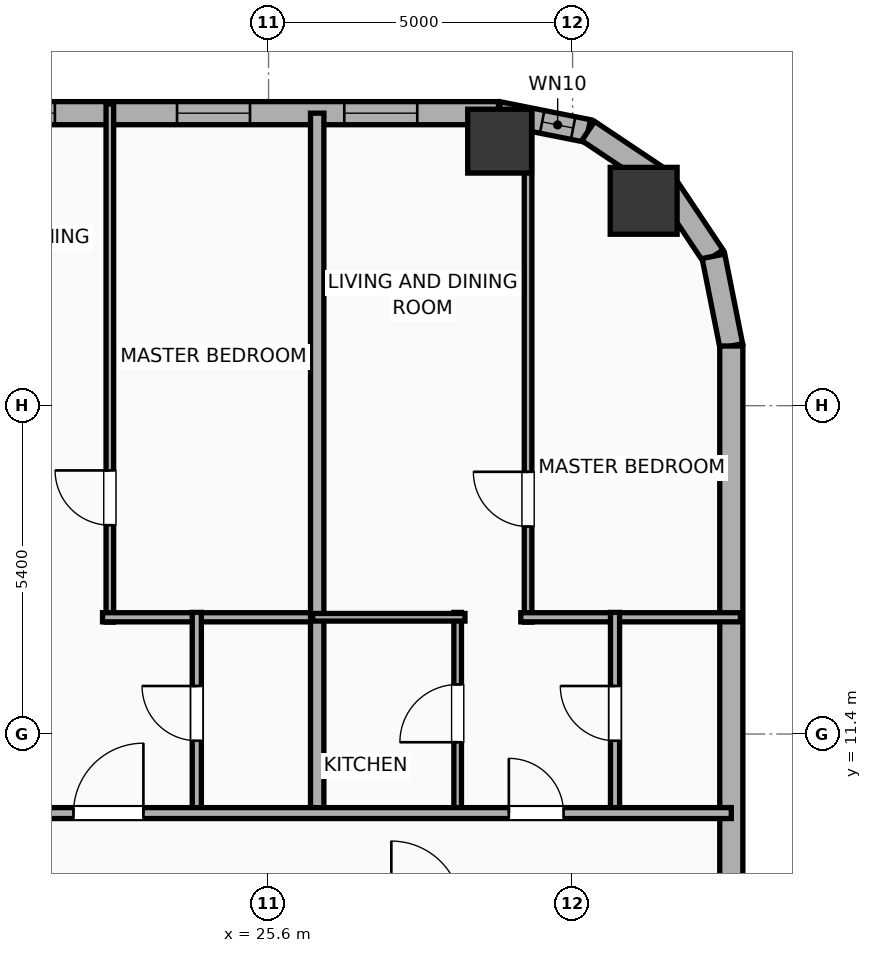
"""IFC4 building model, lengths in metres.
Left out: names, types, materials, properties, quantities, classifications, styles, units other than length and angle.
Written with IfcOpenShell. Run it as: python <this file> out.ifc"""

import sys

from ifc_helpers import new_model, si_unit, direction, frame, frame_2d, origin, origin_2d, place, context, subcontext, project, spatial, rectangle, hollow_rectangle, hollow_circle, extrude, element, fill, save


model = new_model("IFC4")
c1 = context("Model", 3, precision=1e-05, world=origin(), true_north=direction((0.0, 1.0)))
c2 = subcontext(c1, "Body", "Model", "MODEL_VIEW")
j1 = project(units=[si_unit("LENGTHUNIT", "METRE"), si_unit("PLANEANGLEUNIT", "RADIAN")], contexts=[c1])
p1 = place(None, origin())
s1 = spatial("IfcSite", under=j1, at=p1, CompositionType="ELEMENT")
p2 = place(p1, origin())
s2 = spatial("IfcBuilding", under=s1, at=p2, CompositionType="ELEMENT")
p3 = place(p2, frame((0.0, 0.0, 136.5)))
s3 = spatial("IfcBuildingStorey", under=s2, at=p3, CompositionType="ELEMENT", Elevation=136.5)
p4 = place(p3, frame((31.769, 20.169, 0.0), z_axis=(0.0, 0.0, 1.0), x_axis=(1.0, 0.0, 0.0)))
e1 = element("IfcColumn", 1, at=p4, inside=s3, PredefinedType="COLUMN", context=c2, shape_type="SweptSolid", body=[
    extrude(hollow_circle(Radius=0.55, WallThickness=0.036, at=origin_2d()), origin(), (0.0, 0.0, 1.0), 3.865),
])
p5 = place(p3, frame((29.4, 21.15, 0.0), z_axis=(0.0, 0.0, 1.0), x_axis=(1.0, 0.0, 0.0)))
e2 = element("IfcColumn", 2, at=p5, inside=s3, PredefinedType="COLUMN", context=c2, shape_type="SweptSolid", body=[
    extrude(hollow_rectangle(XDim=1.05, YDim=1.05, WallThickness=0.036, at=origin_2d()), origin(), (0.0, 0.0, 1.0), 3.865),
])
p6 = place(p3, frame((-25.381, 21.61, 0.0), z_axis=(0.0, 0.0, 1.0), x_axis=(1.0, 0.0, 0.0)))
e3 = element("IfcWall", 3, at=p6, inside=s3, PredefinedType="ELEMENTEDWALL", context=c2, shape_type="SweptSolid", body=[
    extrude(rectangle(XDim=54.763, YDim=0.38, at=frame_2d((27.381, 0.0))), origin(), (0.0, 0.0, 1.0), 2.39),
])
p7 = place(p6, frame((5.645, 0.0, 0.75)))
e4 = element("IfcOpeningElement", 4, at=p7, cuts=e3, PredefinedType="OPENING", context=c2, shape_type="SweptSolid", body=[
    extrude(rectangle(XDim=2.4, YDim=1.45, at=frame_2d((1.2, 0.725))), frame((0.0, 0.2, 0.0), z_axis=(0.0, -1.0, 0.0), x_axis=(1.0, 0.0, 0.0)), (0.0, 0.0, 1.0), 0.4),
])
p8 = place(p6, frame((34.677, 0.0, 0.75)))
e5 = element("IfcOpeningElement", 5, at=p8, cuts=e3, PredefinedType="OPENING", context=c2, shape_type="SweptSolid", body=[
    extrude(rectangle(XDim=2.4, YDim=1.45, at=frame_2d((1.2, 0.725))), frame((0.0, 0.2, 0.0), z_axis=(0.0, -1.0, 0.0), x_axis=(1.0, 0.0, 0.0)), (0.0, 0.0, 1.0), 0.4),
])
p9 = place(p6, frame((45.067, 0.0, 0.75)))
e6 = element("IfcOpeningElement", 6, at=p9, cuts=e3, PredefinedType="OPENING", context=c2, shape_type="SweptSolid", body=[
    extrude(rectangle(XDim=2.4, YDim=1.45, at=frame_2d((1.2, 0.725))), frame((0.0, 0.2, 0.0), z_axis=(0.0, -1.0, 0.0), x_axis=(1.0, 0.0, 0.0)), (0.0, 0.0, 1.0), 0.4),
])
p10 = place(p6, frame((2.938, 0.0, 0.55)))
e7 = element("IfcOpeningElement", 7, at=p10, cuts=e3, PredefinedType="OPENING", context=c2, shape_type="SweptSolid", body=[
    extrude(rectangle(XDim=1.2, YDim=1.15, at=frame_2d((0.6, 0.575))), frame((0.0, 0.2, 0.0), z_axis=(0.0, -1.0, 0.0), x_axis=(1.0, 0.0, 0.0)), (0.0, 0.0, 1.0), 0.4),
])
p11 = place(p6, frame((8.916, 0.0, 0.55)))
e8 = element("IfcOpeningElement", 8, at=p11, cuts=e3, PredefinedType="OPENING", context=c2, shape_type="SweptSolid", body=[
    extrude(rectangle(XDim=1.2, YDim=1.15, at=frame_2d((0.6, 0.575))), frame((0.0, 0.2, 0.0), z_axis=(0.0, -1.0, 0.0), x_axis=(1.0, 0.0, 0.0)), (0.0, 0.0, 1.0), 0.4),
])
p12 = place(p6, frame((13.476, 0.0, 0.55)))
e9 = element("IfcOpeningElement", 9, at=p12, cuts=e3, PredefinedType="OPENING", context=c2, shape_type="SweptSolid", body=[
    extrude(rectangle(XDim=1.2, YDim=1.15, at=frame_2d((0.6, 0.575))), frame((0.0, 0.2, 0.0), z_axis=(0.0, -1.0, 0.0), x_axis=(1.0, 0.0, 0.0)), (0.0, 0.0, 1.0), 0.4),
])
p13 = place(p6, frame((17.076, 0.0, 0.55)))
e10 = element("IfcOpeningElement", 10, at=p13, cuts=e3, PredefinedType="OPENING", context=c2, shape_type="SweptSolid", body=[
    extrude(rectangle(XDim=1.2, YDim=1.15, at=frame_2d((0.6, 0.575))), frame((0.0, 0.2, 0.0), z_axis=(0.0, -1.0, 0.0), x_axis=(1.0, 0.0, 0.0)), (0.0, 0.0, 1.0), 0.4),
])
p14 = place(p6, frame((19.956, 0.0, 0.55)))
e11 = element("IfcOpeningElement", 11, at=p14, cuts=e3, PredefinedType="OPENING", context=c2, shape_type="SweptSolid", body=[
    extrude(rectangle(XDim=1.2, YDim=1.15, at=frame_2d((0.6, 0.575))), frame((0.0, 0.2, 0.0), z_axis=(0.0, -1.0, 0.0), x_axis=(1.0, 0.0, 0.0)), (0.0, 0.0, 1.0), 0.4),
])
p15 = place(p6, frame((24.276, 0.0, 0.55)))
e12 = element("IfcOpeningElement", 12, at=p15, cuts=e3, PredefinedType="OPENING", context=c2, shape_type="SweptSolid", body=[
    extrude(rectangle(XDim=1.2, YDim=1.15, at=frame_2d((0.6, 0.575))), frame((0.0, 0.2, 0.0), z_axis=(0.0, -1.0, 0.0), x_axis=(1.0, 0.0, 0.0)), (0.0, 0.0, 1.0), 0.4),
])
p16 = place(p6, frame((27.876, 0.0, 0.55)))
e13 = element("IfcOpeningElement", 13, at=p16, cuts=e3, PredefinedType="OPENING", context=c2, shape_type="SweptSolid", body=[
    extrude(rectangle(XDim=1.2, YDim=1.15, at=frame_2d((0.6, 0.575))), frame((0.0, 0.2, 0.0), z_axis=(0.0, -1.0, 0.0), x_axis=(1.0, 0.0, 0.0)), (0.0, 0.0, 1.0), 0.4),
])
p17 = place(p6, frame((30.876, 0.0, 0.55)))
e14 = element("IfcOpeningElement", 14, at=p17, cuts=e3, PredefinedType="OPENING", context=c2, shape_type="SweptSolid", body=[
    extrude(rectangle(XDim=1.2, YDim=1.15, at=frame_2d((0.6, 0.575))), frame((0.0, 0.2, 0.0), z_axis=(0.0, -1.0, 0.0), x_axis=(1.0, 0.0, 0.0)), (0.0, 0.0, 1.0), 0.4),
])
p18 = place(p6, frame((38.676, 0.0, 0.55)))
e15 = element("IfcOpeningElement", 15, at=p18, cuts=e3, PredefinedType="OPENING", context=c2, shape_type="SweptSolid", body=[
    extrude(rectangle(XDim=1.2, YDim=1.15, at=frame_2d((0.6, 0.575))), frame((0.0, 0.2, 0.0), z_axis=(0.0, -1.0, 0.0), x_axis=(1.0, 0.0, 0.0)), (0.0, 0.0, 1.0), 0.4),
])
p19 = place(p6, frame((41.796, 0.0, 0.55)))
e16 = element("IfcOpeningElement", 16, at=p19, cuts=e3, PredefinedType="OPENING", context=c2, shape_type="SweptSolid", body=[
    extrude(rectangle(XDim=1.2, YDim=1.15, at=frame_2d((0.6, 0.575))), frame((0.0, 0.2, 0.0), z_axis=(0.0, -1.0, 0.0), x_axis=(1.0, 0.0, 0.0)), (0.0, 0.0, 1.0), 0.4),
])
p20 = place(p6, frame((49.476, 0.0, 0.55)))
e17 = element("IfcOpeningElement", 17, at=p20, cuts=e3, PredefinedType="OPENING", context=c2, shape_type="SweptSolid", body=[
    extrude(rectangle(XDim=1.2, YDim=1.15, at=frame_2d((0.6, 0.575))), frame((0.0, 0.2, 0.0), z_axis=(0.0, -1.0, 0.0), x_axis=(1.0, 0.0, 0.0)), (0.0, 0.0, 1.0), 0.4),
])
p21 = place(p6, frame((52.227, 0.0, 0.55)))
e18 = element("IfcOpeningElement", 18, at=p21, cuts=e3, PredefinedType="OPENING", context=c2, shape_type="SweptSolid", body=[
    extrude(rectangle(XDim=1.2, YDim=1.15, at=frame_2d((0.6, 0.575))), frame((0.0, 0.2, 0.0), z_axis=(0.0, -1.0, 0.0), x_axis=(1.0, 0.0, 0.0)), (0.0, 0.0, 1.0), 0.4),
])
p22 = place(p3, frame((29.381, 21.61, 0.0), z_axis=(0.0, 0.0, 1.0), x_axis=(0.980755066645, -0.195242155415, 0.0)))
e19 = element("IfcWall", 19, at=p22, inside=s3, PredefinedType="ELEMENTEDWALL", context=c2, shape_type="SweptSolid", body=[
    extrude(rectangle(XDim=1.504, YDim=0.38, at=frame_2d((0.752, 0.0))), origin(), (0.0, 0.0, 1.0), 2.39),
])
p23 = place(p22, frame((0.732, 0.0, 0.55)))
e20 = element("IfcOpeningElement", 20, at=p23, cuts=e19, PredefinedType="OPENING", context=c2, shape_type="SweptSolid", body=[
    extrude(rectangle(XDim=0.52, YDim=1.15, at=frame_2d((0.26, 0.575))), frame((0.0, 0.2, 0.0), z_axis=(0.0, -1.0, 0.0), x_axis=(1.0, 0.0, 0.0)), (0.0, 0.0, 1.0), 0.4),
])
p24 = place(p3, frame((30.857, 21.316, 0.0), z_axis=(0.0, 0.0, 1.0), x_axis=(0.831468045563, -0.555572577804, 0.0)))
e21 = element("IfcWall", 21, at=p24, inside=s3, PredefinedType="ELEMENTEDWALL", context=c2, shape_type="SweptSolid", body=[
    extrude(rectangle(XDim=1.485, YDim=0.38, at=frame_2d((0.742, 0.0))), origin(), (0.0, 0.0, 1.0), 2.39),
])
p25 = place(p3, frame((32.091, 20.491, 0.0), z_axis=(0.0, 0.0, 1.0), x_axis=(0.555610286119, -0.831442848281, 0.0)))
e22 = element("IfcWall", 22, at=p25, inside=s3, PredefinedType="ELEMENTEDWALL", context=c2, shape_type="SweptSolid", body=[
    extrude(rectangle(XDim=1.485, YDim=0.38, at=frame_2d((0.743, 0.0))), origin(), (0.0, 0.0, 1.0), 3.5),
])
p26 = place(p3, frame((32.917, 19.257, 0.0), z_axis=(0.0, 0.0, 1.0), x_axis=(0.195086038585, -0.980786132421, 0.0)))
e23 = element("IfcWall", 23, at=p26, inside=s3, PredefinedType="ELEMENTEDWALL", context=c2, shape_type="SweptSolid", body=[
    extrude(rectangle(XDim=1.504, YDim=0.38, at=frame_2d((0.752, 0.0))), origin(), (0.0, 0.0, 1.0), 3.5),
])
p27 = place(p3, frame((33.21, 17.781, 0.0), z_axis=(0.0, 0.0, 1.0), x_axis=(0.0, -1.0, 0.0)))
e24 = element("IfcWall", 24, at=p27, inside=s3, PredefinedType="ELEMENTEDWALL", context=c2, shape_type="SweptSolid", body=[
    extrude(rectangle(XDim=34.363, YDim=0.38, at=frame_2d((17.181, 0.0))), origin(), (0.0, 0.0, 1.0), 2.39),
])
p28 = place(p27, frame((31.687, 0.0, 0.55)))
e25 = element("IfcOpeningElement", 25, at=p28, cuts=e24, PredefinedType="OPENING", context=c2, shape_type="SweptSolid", body=[
    extrude(rectangle(XDim=1.2, YDim=1.15, at=frame_2d((0.6, 0.575))), frame((0.0, 0.2, 0.0), z_axis=(0.0, -1.0, 0.0), x_axis=(1.0, 0.0, 0.0)), (0.0, 0.0, 1.0), 0.4),
])
p29 = place(p27, frame((12.836, 0.0, 0.55)))
e26 = element("IfcOpeningElement", 26, at=p29, cuts=e24, PredefinedType="OPENING", context=c2, shape_type="SweptSolid", body=[
    extrude(rectangle(XDim=1.2, YDim=1.15, at=frame_2d((0.6, 0.575))), frame((0.0, 0.2, 0.0), z_axis=(0.0, -1.0, 0.0), x_axis=(1.0, 0.0, 0.0)), (0.0, 0.0, 1.0), 0.4),
])
p30 = place(p27, frame((21.386, 0.0, 0.55)))
e27 = element("IfcOpeningElement", 27, at=p30, cuts=e24, PredefinedType="OPENING", context=c2, shape_type="SweptSolid", body=[
    extrude(rectangle(XDim=1.2, YDim=1.15, at=frame_2d((0.6, 0.575))), frame((0.0, 0.2, 0.0), z_axis=(0.0, -1.0, 0.0), x_axis=(1.0, 0.0, 0.0)), (0.0, 0.0, 1.0), 0.4),
])
p31 = place(p3, frame((22.99, 13.24, 0.0), z_axis=(0.0, 0.0, 1.0), x_axis=(0.0, 1.0, 0.0)))
e28 = element("IfcWall", 28, at=p31, inside=s3, PredefinedType="PARTITIONING", context=c2, shape_type="SweptSolid", body=[
    extrude(rectangle(XDim=8.52, YDim=0.125, at=frame_2d((4.26, 0.0))), origin(), (0.0, 0.0, 1.0), 2.39),
])
p32 = place(p31, frame((1.595, 0.0, 0.0)))
e29 = element("IfcOpeningElement", 29, at=p32, cuts=e28, PredefinedType="OPENING", context=c2, shape_type="SweptSolid", body=[
    extrude(rectangle(XDim=0.9, YDim=2.05, at=frame_2d((0.45, 1.025))), frame((0.0, 0.073, 0.0), z_axis=(0.0, -1.0, 0.0), x_axis=(1.0, 0.0, 0.0)), (0.0, 0.0, 1.0), 0.145),
])
p33 = place(p3, frame((22.87, 13.32, 0.0), z_axis=(0.0, 0.0, 1.0), x_axis=(1.0, 0.0, 0.0)))
e30 = element("IfcWall", 30, at=p33, inside=s3, PredefinedType="PLUMBINGWALL", context=c2, shape_type="SweptSolid", body=[
    extrude(rectangle(XDim=3.605, YDim=0.15, at=frame_2d((1.802, 0.0))), origin(), (0.0, 0.0, 1.0), 3.5),
])
p34 = place(p3, frame((24.42, 10.08, 0.0), z_axis=(0.0, 0.0, 1.0), x_axis=(0.0, 1.0, 0.0)))
e31 = element("IfcWall", 31, at=p34, inside=s3, PredefinedType="PLUMBINGWALL", context=c2, shape_type="SweptSolid", body=[
    extrude(rectangle(XDim=3.32, YDim=0.15, at=frame_2d((1.66, 0.0))), origin(), (0.0, 0.0, 1.0), 2.39),
])
p35 = place(p34, frame((1.21, 0.0, 0.0)))
e32 = element("IfcOpeningElement", 32, at=p35, cuts=e31, PredefinedType="OPENING", context=c2, shape_type="SweptSolid", body=[
    extrude(rectangle(XDim=0.9, YDim=2.05, at=frame_2d((0.45, 1.025))), frame((0.0, 0.085, 0.0), z_axis=(0.0, -1.0, 0.0), x_axis=(1.0, 0.0, 0.0)), (0.0, 0.0, 1.0), 0.17),
])
p36 = place(p3, frame((26.4, 10.02, 0.0), z_axis=(0.0, 0.0, 1.0), x_axis=(0.0, 1.0, 0.0)))
e33 = element("IfcWall", 33, at=p36, inside=s3, PredefinedType="PARTITIONING", context=c2, shape_type="SweptSolid", body=[
    extrude(rectangle(XDim=11.59, YDim=0.22, at=frame_2d((5.795, 0.0))), origin(), (0.0, 0.0, 1.0), 3.5),
])
p37 = place(p3, frame((29.868, 13.24, 0.0), z_axis=(0.0, 0.0, 1.0), x_axis=(0.0, 1.0, 0.0)))
e34 = element("IfcWall", 34, at=p37, inside=s3, PredefinedType="PARTITIONING", context=c2, shape_type="SweptSolid", body=[
    extrude(rectangle(XDim=8.426, YDim=0.125, at=frame_2d((4.213, 0.0))), origin(), (0.0, 0.0, 1.0), 3.5),
])
p38 = place(p37, frame((1.572, 0.0, 0.0)))
e35 = element("IfcOpeningElement", 35, at=p38, cuts=e34, PredefinedType="OPENING", context=c2, shape_type="SweptSolid", body=[
    extrude(rectangle(XDim=0.9, YDim=2.05, at=frame_2d((0.45, 1.025))), frame((0.0, 0.073, 0.0), z_axis=(0.0, -1.0, 0.0), x_axis=(1.0, 0.0, 0.0)), (0.0, 0.0, 1.0), 0.145),
])
p39 = place(p3, frame((29.748, 13.32, 0.0), z_axis=(0.0, 0.0, 1.0), x_axis=(1.0, 0.0, 0.0)))
e36 = element("IfcWall", 36, at=p39, inside=s3, PredefinedType="PLUMBINGWALL", context=c2, shape_type="SweptSolid", body=[
    extrude(rectangle(XDim=3.612, YDim=0.15, at=frame_2d((1.806, 0.0))), origin(), (0.0, 0.0, 1.0), 3.5),
])
p40 = place(p3, frame((28.71, 10.08, 0.0), z_axis=(0.0, 0.0, 1.0), x_axis=(0.0, 1.0, 0.0)))
e37 = element("IfcWall", 37, at=p40, inside=s3, PredefinedType="PARTITIONING", context=c2, shape_type="SweptSolid", body=[
    extrude(rectangle(XDim=3.32, YDim=0.125, at=frame_2d((1.66, 0.0))), origin(), (0.0, 0.0, 1.0), 3.5),
])
p41 = place(p40, frame((1.185, 0.0, 0.0)))
e38 = element("IfcOpeningElement", 38, at=p41, cuts=e37, PredefinedType="OPENING", context=c2, shape_type="SweptSolid", body=[
    extrude(rectangle(XDim=0.95, YDim=2.05, at=frame_2d((0.475, 1.025))), frame((0.0, 0.073, 0.0), z_axis=(0.0, -1.0, 0.0), x_axis=(1.0, 0.0, 0.0)), (0.0, 0.0, 1.0), 0.145),
])
p42 = place(p3, frame((26.325, 13.32, 0.0), z_axis=(0.0, 0.0, 1.0), x_axis=(1.0, 0.0, 0.0)))
e39 = element("IfcWall", 39, at=p42, inside=s3, PredefinedType="PARTITIONING", context=c2, shape_type="SweptSolid", body=[
    extrude(rectangle(XDim=2.505, YDim=0.125, at=frame_2d((1.252, 0.0))), origin(), (0.0, 0.0, 1.0), 3.5),
])
p43 = place(p3, frame((31.298, 10.08, 0.0), z_axis=(0.0, 0.0, 1.0), x_axis=(0.0, 1.0, 0.0)))
e40 = element("IfcWall", 40, at=p43, inside=s3, PredefinedType="PLUMBINGWALL", context=c2, shape_type="SweptSolid", body=[
    extrude(rectangle(XDim=3.32, YDim=0.15, at=frame_2d((1.66, 0.0))), origin(), (0.0, 0.0, 1.0), 3.5),
])
p44 = place(p43, frame((1.21, 0.0, 0.0)))
e41 = element("IfcOpeningElement", 41, at=p44, cuts=e40, PredefinedType="OPENING", context=c2, shape_type="SweptSolid", body=[
    extrude(rectangle(XDim=0.9, YDim=2.05, at=frame_2d((0.45, 1.025))), frame((0.0, 0.085, 0.0), z_axis=(0.0, -1.0, 0.0), x_axis=(1.0, 0.0, 0.0)), (0.0, 0.0, 1.0), 0.17),
])
p45 = place(p3, frame((-29.21, 10.1, 0.0), z_axis=(0.0, 0.0, 1.0), x_axis=(1.0, 0.0, 0.0)))
e42 = element("IfcWall", 42, at=p45, inside=s3, PredefinedType="PARTITIONING", context=c2, shape_type="SweptSolid", body=[
    extrude(rectangle(XDim=62.42, YDim=0.18, at=frame_2d((31.21, 0.0))), origin(), (0.0, 0.0, 1.0), 2.39),
])
p46 = place(p45, frame((2.74, 0.0, 0.0)))
e43 = element("IfcOpeningElement", 43, at=p46, cuts=e42, PredefinedType="OPENING", context=c2, shape_type="SweptSolid", body=[
    extrude(rectangle(XDim=0.9, YDim=2.05, at=frame_2d((0.45, 1.025))), frame((0.0, 0.1, 0.0), z_axis=(0.0, -1.0, 0.0), x_axis=(1.0, 0.0, 0.0)), (0.0, 0.0, 1.0), 0.2),
])
p47 = place(p45, frame((9.868, 0.0, 0.0)))
e44 = element("IfcOpeningElement", 44, at=p47, cuts=e42, PredefinedType="OPENING", context=c2, shape_type="SweptSolid", body=[
    extrude(rectangle(XDim=1.15, YDim=2.05, at=frame_2d((0.575, 1.025))), frame((0.0, 0.1, 0.0), z_axis=(0.0, -1.0, 0.0), x_axis=(1.0, 0.0, 0.0)), (0.0, 0.0, 1.0), 0.2),
])
p48 = place(p45, frame((15.598, 0.0, 0.0)))
e45 = element("IfcOpeningElement", 45, at=p48, cuts=e42, PredefinedType="OPENING", context=c2, shape_type="SweptSolid", body=[
    extrude(rectangle(XDim=1.15, YDim=2.05, at=frame_2d((0.575, 1.025))), frame((0.0, 0.1, 0.0), z_axis=(0.0, -1.0, 0.0), x_axis=(1.0, 0.0, 0.0)), (0.0, 0.0, 1.0), 0.2),
])
p49 = place(p45, frame((22.801, 0.0, 0.0)))
e46 = element("IfcOpeningElement", 46, at=p49, cuts=e42, PredefinedType="OPENING", context=c2, shape_type="SweptSolid", body=[
    extrude(rectangle(XDim=1.15, YDim=2.05, at=frame_2d((0.575, 1.025))), frame((0.0, 0.1, 0.0), z_axis=(0.0, -1.0, 0.0), x_axis=(1.0, 0.0, 0.0)), (0.0, 0.0, 1.0), 0.2),
])
p50 = place(p45, frame((29.998, 0.0, 0.0)))
e47 = element("IfcOpeningElement", 47, at=p50, cuts=e42, PredefinedType="OPENING", context=c2, shape_type="SweptSolid", body=[
    extrude(rectangle(XDim=1.15, YDim=2.05, at=frame_2d((0.575, 1.025))), frame((0.0, 0.1, 0.0), z_axis=(0.0, -1.0, 0.0), x_axis=(1.0, 0.0, 0.0)), (0.0, 0.0, 1.0), 0.2),
])
p51 = place(p45, frame((37.202, 0.0, 0.0)))
e48 = element("IfcOpeningElement", 48, at=p51, cuts=e42, PredefinedType="OPENING", context=c2, shape_type="SweptSolid", body=[
    extrude(rectangle(XDim=1.15, YDim=2.05, at=frame_2d((0.575, 1.025))), frame((0.0, 0.1, 0.0), z_axis=(0.0, -1.0, 0.0), x_axis=(1.0, 0.0, 0.0)), (0.0, 0.0, 1.0), 0.2),
])
p52 = place(p45, frame((44.399, 0.0, 0.0)))
e49 = element("IfcOpeningElement", 49, at=p52, cuts=e42, PredefinedType="OPENING", context=c2, shape_type="SweptSolid", body=[
    extrude(rectangle(XDim=1.15, YDim=2.05, at=frame_2d((0.575, 1.025))), frame((0.0, 0.1, 0.0), z_axis=(0.0, -1.0, 0.0), x_axis=(1.0, 0.0, 0.0)), (0.0, 0.0, 1.0), 0.2),
])
p53 = place(p45, frame((51.602, 0.0, 0.0)))
e50 = element("IfcOpeningElement", 50, at=p53, cuts=e42, PredefinedType="OPENING", context=c2, shape_type="SweptSolid", body=[
    extrude(rectangle(XDim=1.15, YDim=2.05, at=frame_2d((0.575, 1.025))), frame((0.0, 0.1, 0.0), z_axis=(0.0, -1.0, 0.0), x_axis=(1.0, 0.0, 0.0)), (0.0, 0.0, 1.0), 0.2),
])
p54 = place(p45, frame((58.762, 0.0, 0.0)))
e51 = element("IfcOpeningElement", 51, at=p54, cuts=e42, PredefinedType="OPENING", context=c2, shape_type="SweptSolid", body=[
    extrude(rectangle(XDim=0.9, YDim=2.05, at=frame_2d((0.45, 1.025))), frame((0.0, 0.1, 0.0), z_axis=(0.0, -1.0, 0.0), x_axis=(1.0, 0.0, 0.0)), (0.0, 0.0, 1.0), 0.2),
])
p55 = place(p9, origin())
e52 = element("IfcWindow", 52, at=p55, inside=s3, PartitioningType="SINGLE_PANEL", PredefinedType="WINDOW", context=c2, shape_type="SweptSolid", body=[
    extrude(rectangle(XDim=2.4, YDim=1.45, at=frame_2d((1.2, 0.725))), frame((0.0, 0.03, 0.0), z_axis=(0.0, -1.0, 0.0), x_axis=(1.0, 0.0, 0.0)), (0.0, 0.0, 1.0), 0.06),
])
fill(e6, e52)
p56 = place(p20, origin())
e53 = element("IfcWindow", 53, at=p56, inside=s3, PartitioningType="SINGLE_PANEL", PredefinedType="WINDOW", context=c2, shape_type="SweptSolid", body=[
    extrude(rectangle(XDim=1.2, YDim=1.15, at=frame_2d((0.6, 0.575))), frame((0.0, 0.03, 0.0), z_axis=(0.0, -1.0, 0.0), x_axis=(1.0, 0.0, 0.0)), (0.0, 0.0, 1.0), 0.06),
])
fill(e17, e53)
p57 = place(p21, origin())
e54 = element("IfcWindow", 54, at=p57, inside=s3, PartitioningType="SINGLE_PANEL", PredefinedType="WINDOW", context=c2, shape_type="SweptSolid", body=[
    extrude(rectangle(XDim=1.2, YDim=1.15, at=frame_2d((0.6, 0.575))), frame((0.0, 0.03, 0.0), z_axis=(0.0, -1.0, 0.0), x_axis=(1.0, 0.0, 0.0)), (0.0, 0.0, 1.0), 0.06),
])
fill(e18, e54)
p58 = place(p23, origin())
e55 = element("IfcWindow", 55, at=p58, inside=s3, PartitioningType="SINGLE_PANEL", PredefinedType="WINDOW", context=c2, shape_type="SweptSolid", body=[
    extrude(rectangle(XDim=0.52, YDim=1.15, at=frame_2d((0.26, 0.575))), frame((0.0, 0.03, 0.0), z_axis=(0.0, -1.0, 0.0), x_axis=(1.0, 0.0, 0.0)), (0.0, 0.0, 1.0), 0.06),
])
fill(e20, e55)
p59 = place(p32, origin())
e56 = element("IfcDoor", 56, at=p59, inside=s3, OperationType="SINGLE_SWING_RIGHT", PredefinedType="DOOR", context=c2, shape_type="SweptSolid", body=[
    extrude(rectangle(XDim=0.9, YDim=2.05, at=frame_2d((0.45, 1.025))), frame((0.0, 0.025, 0.0), z_axis=(0.0, -1.0, 0.0), x_axis=(1.0, 0.0, 0.0)), (0.0, 0.0, 1.0), 0.05),
])
fill(e29, e56)
p60 = place(p35, origin())
e57 = element("IfcDoor", 57, at=p60, inside=s3, OperationType="SINGLE_SWING_RIGHT", PredefinedType="DOOR", context=c2, shape_type="SweptSolid", body=[
    extrude(rectangle(XDim=0.9, YDim=2.05, at=frame_2d((0.45, 1.025))), frame((0.0, 0.025, 0.0), z_axis=(0.0, -1.0, 0.0), x_axis=(1.0, 0.0, 0.0)), (0.0, 0.0, 1.0), 0.05),
])
fill(e32, e57)
p61 = place(p38, origin())
e58 = element("IfcDoor", 58, at=p61, inside=s3, OperationType="SINGLE_SWING_RIGHT", PredefinedType="DOOR", context=c2, shape_type="SweptSolid", body=[
    extrude(rectangle(XDim=0.9, YDim=2.05, at=frame_2d((0.45, 1.025))), frame((0.0, 0.025, 0.0), z_axis=(0.0, -1.0, 0.0), x_axis=(1.0, 0.0, 0.0)), (0.0, 0.0, 1.0), 0.05),
])
fill(e35, e58)
p62 = place(p41, origin())
e59 = element("IfcDoor", 59, at=p62, inside=s3, OperationType="SINGLE_SWING_LEFT", PredefinedType="DOOR", context=c2, shape_type="SweptSolid", body=[
    extrude(rectangle(XDim=0.95, YDim=2.05, at=frame_2d((0.475, 1.025))), frame((0.0, 0.025, 0.0), z_axis=(0.0, -1.0, 0.0), x_axis=(1.0, 0.0, 0.0)), (0.0, 0.0, 1.0), 0.05),
])
fill(e38, e59)
p63 = place(p44, origin())
e60 = element("IfcDoor", 60, at=p63, inside=s3, OperationType="SINGLE_SWING_RIGHT", PredefinedType="DOOR", context=c2, shape_type="SweptSolid", body=[
    extrude(rectangle(XDim=0.9, YDim=2.05, at=frame_2d((0.45, 1.025))), frame((0.0, 0.025, 0.0), z_axis=(0.0, -1.0, 0.0), x_axis=(1.0, 0.0, 0.0)), (0.0, 0.0, 1.0), 0.05),
])
fill(e41, e60)
p64 = place(p53, origin())
e61 = element("IfcDoor", 61, at=p64, inside=s3, OperationType="SINGLE_SWING_RIGHT", PredefinedType="DOOR", context=c2, shape_type="SweptSolid", body=[
    extrude(rectangle(XDim=1.15, YDim=2.05, at=frame_2d((0.575, 1.025))), frame((0.0, 0.025, 0.0), z_axis=(0.0, -1.0, 0.0), x_axis=(1.0, 0.0, 0.0)), (0.0, 0.0, 1.0), 0.05),
])
fill(e50, e61)
p65 = place(p54, origin())
e62 = element("IfcDoor", 62, at=p65, inside=s3, OperationType="SINGLE_SWING_LEFT", PredefinedType="DOOR", context=c2, shape_type="SweptSolid", body=[
    extrude(rectangle(XDim=0.9, YDim=2.05, at=frame_2d((0.45, 1.025))), frame((0.0, 0.025, 0.0), z_axis=(0.0, -1.0, 0.0), x_axis=(1.0, 0.0, 0.0)), (0.0, 0.0, 1.0), 0.05),
])
fill(e51, e62)
save(model, sys.argv[1])
